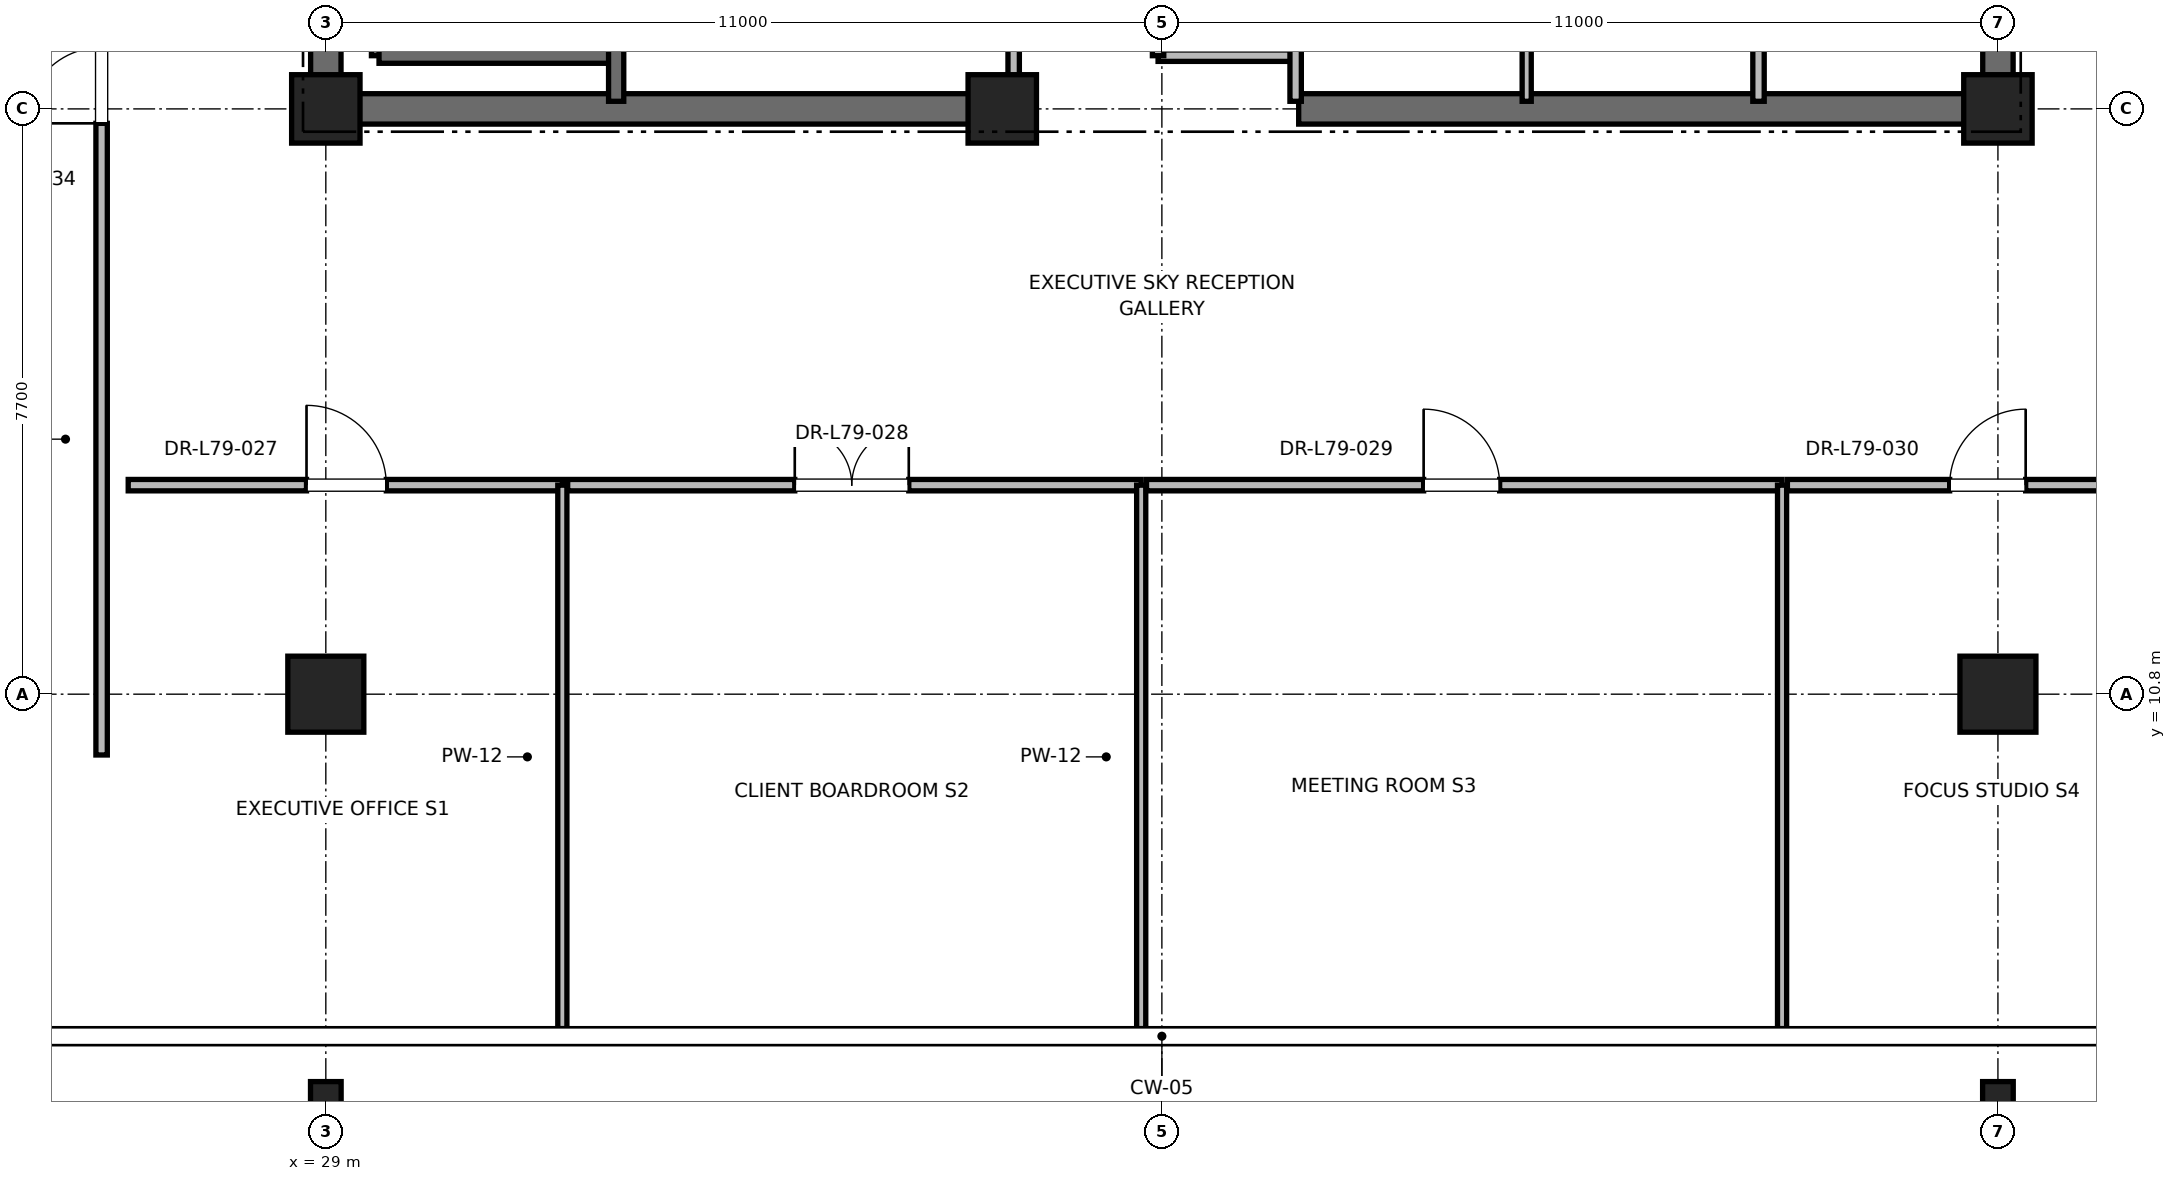
"""IFC4 building model, lengths in metres.
Left out: names, types, materials, properties, quantities, classifications, styles, units other than length and angle.
Written with IfcOpenShell. Run it as: python <this file> out.ifc"""

import sys

from ifc_helpers import new_model, si_unit, direction, frame, frame_2d, origin, origin_2d, place, context, subcontext, project, spatial, rectangle, i_section, extrude, element, fill, save


model = new_model("IFC4")
c1 = context("Model", 3, precision=1e-05, world=origin(), true_north=direction((0.0, 1.0)))
c2 = subcontext(c1, "Body", "Model", "MODEL_VIEW")
j1 = project(units=[si_unit("LENGTHUNIT", "METRE"), si_unit("PLANEANGLEUNIT", "RADIAN")], contexts=[c1])
p1 = place(None, origin())
s1 = spatial("IfcSite", under=j1, at=p1, CompositionType="ELEMENT")
p2 = place(p1, origin())
s2 = spatial("IfcBuilding", under=s1, at=p2, CompositionType="ELEMENT")
p3 = place(p2, frame((0.0, 0.0, 338.8)))
s3 = spatial("IfcBuildingStorey", under=s2, at=p3, CompositionType="ELEMENT", Elevation=338.8)
for number, where, z_axis, x_axis in (
    (1, (29.0, 10.8, 0.0), (0.0, 0.0, 1.0), (1.0, 0.0, 0.0)),
    (2, (51.0, 10.8, 0.0), (0.0, 0.0, 1.0), (1.0, 0.0, 0.0)),
):
    element("IfcColumn", number, at=place(p3, frame(where, z_axis=z_axis, x_axis=x_axis)), inside=s3, PredefinedType="COLUMN", context=c2, shape_type="SweptSolid", body=[
        extrude(rectangle(XDim=1.0, YDim=1.0, at=origin_2d()), origin(), (0.0, 0.0, 1.0), 4.0),
    ])
for number, where, z_axis, x_axis in (
    (3, (29.0, 5.5, 0.0), (0.0, 0.0, 1.0), (1.0, 0.0, 0.0)),
    (4, (51.0, 5.5, 0.0), (0.0, 0.0, 1.0), (1.0, 0.0, 0.0)),
):
    element("IfcColumn", number, at=place(p3, frame(where, z_axis=z_axis, x_axis=x_axis)), inside=s3, PredefinedType="COLUMN", context=c2, shape_type="SweptSolid", body=[
        extrude(i_section(OverallWidth=0.403, OverallDepth=0.406, WebThickness=0.027, FlangeThickness=0.043, FilletRadius=0.015, at=origin_2d()), origin(), (0.0, 0.0, 1.0), 4.0),
    ])
for number, where, z_axis, x_axis in (
    (5, (29.0, 18.5, 0.0), (0.0, 0.0, 1.0), (1.0, 0.0, 0.0)),
    (6, (51.0, 18.5, 0.0), (0.0, 0.0, 1.0), (1.0, 0.0, 0.0)),
    (7, (37.9, 18.5, 0.0), (0.0, 0.0, 1.0), (1.0, 0.0, 0.0)),
):
    element("IfcColumn", number, at=place(p3, frame(where, z_axis=z_axis, x_axis=x_axis)), inside=s3, PredefinedType="PILASTER", context=c2, shape_type="SweptSolid", body=[
        extrude(rectangle(XDim=0.9, YDim=0.9, at=origin_2d()), origin(), (0.0, 0.0, 1.0), 4.0),
    ])
for number, where, z_axis, x_axis in (
    (8, (29.0, 18.5, 0.0), (0.0, 0.0, 1.0), (1.0, 0.0, 0.0)),
    (9, (41.8, 18.5, 0.0), (0.0, 0.0, 1.0), (1.0, 0.0, 0.0)),
):
    element("IfcWall", number, at=place(p3, frame(where, z_axis=z_axis, x_axis=x_axis)), inside=s3, PredefinedType="SHEAR", context=c2, shape_type="SweptSolid", body=[
        extrude(rectangle(XDim=9.2, YDim=0.4, at=frame_2d((4.6, 0.0))), origin(), (0.0, 0.0, 1.0), 3.7),
    ])
p4 = place(p3, frame((29.0, 18.5, 0.0), z_axis=(0.0, 0.0, 1.0), x_axis=(0.0, 1.0, 0.0)))
e10 = element("IfcWall", 10, at=p4, inside=s3, PredefinedType="SHEAR", context=c2, shape_type="SweptSolid", body=[
    extrude(rectangle(XDim=8.8, YDim=0.4, at=frame_2d((4.4, 0.0))), origin(), (0.0, 0.0, 1.0), 3.7),
])
p5 = place(p3, frame((51.0, 18.5, 0.0), z_axis=(0.0, 0.0, 1.0), x_axis=(0.0, 1.0, 0.0)))
e11 = element("IfcWall", 11, at=p5, inside=s3, PredefinedType="SHEAR", context=c2, shape_type="SweptSolid", body=[
    extrude(rectangle(XDim=5.8, YDim=0.4, at=frame_2d((2.9, 0.0))), origin(), (0.0, 0.0, 1.0), 3.7),
])
p6 = place(p3, frame((29.7, 19.2, 0.0), z_axis=(0.0, 0.0, 1.0), x_axis=(0.0, 1.0, 0.0)))
e12 = element("IfcWall", 12, at=p6, inside=s3, PredefinedType="SOLIDWALL", context=c2, shape_type="SweptSolid", body=[
    extrude(rectangle(XDim=8.15, YDim=0.2, at=frame_2d((4.075, 0.0))), origin(), (0.0, 0.0, 1.0), 3.7),
])
p7 = place(p3, frame((29.7, 19.2, 0.0), z_axis=(0.0, 0.0, 1.0), x_axis=(1.0, 0.0, 0.0)))
e13 = element("IfcWall", 13, at=p7, inside=s3, PredefinedType="SOLIDWALL", context=c2, shape_type="SweptSolid", body=[
    extrude(rectangle(XDim=3.12, YDim=0.2, at=frame_2d((1.56, 0.0))), origin(), (0.0, 0.0, 1.0), 3.7),
])
p8 = place(p3, frame((32.82, 18.6, 0.0), z_axis=(0.0, 0.0, 1.0), x_axis=(0.0, 1.0, 0.0)))
e14 = element("IfcWall", 14, at=p8, inside=s3, PredefinedType="SOLIDWALL", context=c2, shape_type="SweptSolid", body=[
    extrude(rectangle(XDim=8.78, YDim=0.2, at=frame_2d((4.39, 0.0))), origin(), (0.0, 0.0, 1.0), 3.7),
])
p9 = place(p3, frame((39.95, 19.2, 0.0), z_axis=(0.0, 0.0, 1.0), x_axis=(1.0, 0.0, 0.0)))
e15 = element("IfcWall", 15, at=p9, inside=s3, PredefinedType="PARTITIONING", context=c2, shape_type="SweptSolid", body=[
    extrude(rectangle(XDim=1.81, YDim=0.15, at=frame_2d((0.905, 0.0))), origin(), (0.0, 0.0, 1.0), 2.85),
])
p10 = place(p3, frame((41.76, 18.6, 0.0), z_axis=(0.0, 0.0, 1.0), x_axis=(0.0, 1.0, 0.0)))
e16 = element("IfcWall", 16, at=p10, inside=s3, PredefinedType="PARTITIONING", context=c2, shape_type="SweptSolid", body=[
    extrude(rectangle(XDim=3.6, YDim=0.15, at=frame_2d((1.8, 0.0))), origin(), (0.0, 0.0, 1.0), 2.78),
])
p11 = place(p3, frame((39.95, 19.2, 0.0), z_axis=(0.0, 0.0, 1.0), x_axis=(0.0, 1.0, 0.0)))
e17 = element("IfcWall", 17, at=p11, inside=s3, PredefinedType="PARTITIONING", context=c2, shape_type="SweptSolid", body=[
    extrude(rectangle(XDim=3.0, YDim=0.15, at=frame_2d((1.5, 0.0))), origin(), (0.0, 0.0, 1.0), 2.85),
])
p12 = place(p11, frame((1.05, 0.0, 0.0)))
e18 = element("IfcOpeningElement", 18, at=p12, cuts=e17, PredefinedType="OPENING", context=c2, shape_type="SweptSolid", body=[
    extrude(rectangle(XDim=0.9, YDim=2.1, at=frame_2d((0.45, 1.05))), frame((0.0, 0.075, 0.0), z_axis=(0.0, -1.0, 0.0), x_axis=(1.0, 0.0, 0.0)), (0.0, 0.0, 1.0), 0.15),
])
p13 = place(p3, frame((38.05, 18.6, 0.0), z_axis=(0.0, 0.0, 1.0), x_axis=(0.0, 1.0, 0.0)))
e19 = element("IfcWall", 19, at=p13, inside=s3, PredefinedType="PARTITIONING", context=c2, shape_type="SweptSolid", body=[
    extrude(rectangle(XDim=4.46, YDim=0.15, at=frame_2d((2.23, 0.0))), origin(), (0.0, 0.0, 1.0), 2.78),
])
p14 = place(p13, frame((1.73, 0.0, 0.0)))
e20 = element("IfcOpeningElement", 20, at=p14, cuts=e19, PredefinedType="OPENING", context=c2, shape_type="SweptSolid", body=[
    extrude(rectangle(XDim=1.0, YDim=2.15, at=frame_2d((0.5, 1.075))), frame((0.0, 0.075, 0.0), z_axis=(0.0, -1.0, 0.0), x_axis=(1.0, 0.0, 0.0)), (0.0, 0.0, 1.0), 0.15),
])
p15 = place(p3, frame((47.85, 18.6, 0.0), z_axis=(0.0, 0.0, 1.0), x_axis=(0.0, 1.0, 0.0)))
e21 = element("IfcWall", 21, at=p15, inside=s3, PredefinedType="PARTITIONING", context=c2, shape_type="SweptSolid", body=[
    extrude(rectangle(XDim=2.54, YDim=0.15, at=frame_2d((1.27, 0.0))), origin(), (0.0, 0.0, 1.0), 2.85),
])
p16 = place(p3, frame((44.8, 18.6, 0.0), z_axis=(0.0, 0.0, 1.0), x_axis=(0.0, 1.0, 0.0)))
e22 = element("IfcWall", 22, at=p16, inside=s3, PredefinedType="PARTITIONING", context=c2, shape_type="SweptSolid", body=[
    extrude(rectangle(XDim=3.02, YDim=0.12, at=frame_2d((1.51, 0.0))), origin(), (0.0, 0.0, 1.0), 2.85),
])
p17 = place(p3, frame((26.4, 13.55, 0.0), z_axis=(0.0, 0.0, 1.0), x_axis=(1.0, 0.0, 0.0)))
e23 = element("IfcWall", 23, at=p17, inside=s3, PredefinedType="PARTITIONING", context=c2, shape_type="SweptSolid", body=[
    extrude(rectangle(XDim=5.712, YDim=0.15, at=frame_2d((2.856, 0.0))), origin(), (0.0, 0.0, 1.0), 2.753),
])
p18 = place(p17, frame((2.346, 0.0, 0.0)))
e24 = element("IfcOpeningElement", 24, at=p18, cuts=e23, PredefinedType="OPENING", context=c2, shape_type="SweptSolid", body=[
    extrude(rectangle(XDim=1.05, YDim=2.2, at=frame_2d((0.525, 1.1))), frame((0.0, 0.075, 0.0), z_axis=(0.0, -1.0, 0.0), x_axis=(1.0, 0.0, 0.0)), (0.0, 0.0, 1.0), 0.15),
])
p19 = place(p3, frame((32.112, 6.4, 0.0), z_axis=(0.0, 0.0, 1.0), x_axis=(0.0, 1.0, 0.0)))
e25 = element("IfcWall", 25, at=p19, inside=s3, PredefinedType="PARTITIONING", context=c2, shape_type="SweptSolid", body=[
    extrude(rectangle(XDim=7.15, YDim=0.12, at=frame_2d((3.575, 0.0))), origin(), (0.0, 0.0, 1.0), 2.33),
])
p20 = place(p3, frame((32.182, 13.55, 0.0), z_axis=(0.0, 0.0, 1.0), x_axis=(1.0, 0.0, 0.0)))
e26 = element("IfcWall", 26, at=p20, inside=s3, PredefinedType="PARTITIONING", context=c2, shape_type="SweptSolid", body=[
    extrude(rectangle(XDim=7.546, YDim=0.15, at=frame_2d((3.773, 0.0))), origin(), (0.0, 0.0, 1.0), 2.85),
])
p21 = place(p20, frame((2.988, 0.0, 0.0)))
e27 = element("IfcOpeningElement", 27, at=p21, cuts=e26, PredefinedType="OPENING", context=c2, shape_type="SweptSolid", body=[
    extrude(rectangle(XDim=1.5, YDim=2.25, at=frame_2d((0.75, 1.125))), frame((0.0, 0.075, 0.0), z_axis=(0.0, -1.0, 0.0), x_axis=(1.0, 0.0, 0.0)), (0.0, 0.0, 1.0), 0.15),
])
p22 = place(p3, frame((39.728, 6.4, 0.0), z_axis=(0.0, 0.0, 1.0), x_axis=(0.0, 1.0, 0.0)))
e28 = element("IfcWall", 28, at=p22, inside=s3, PredefinedType="PARTITIONING", context=c2, shape_type="SweptSolid", body=[
    extrude(rectangle(XDim=7.15, YDim=0.12, at=frame_2d((3.575, 0.0))), origin(), (0.0, 0.0, 1.0), 2.33),
])
p23 = place(p3, frame((39.798, 13.55, 0.0), z_axis=(0.0, 0.0, 1.0), x_axis=(1.0, 0.0, 0.0)))
e29 = element("IfcWall", 29, at=p23, inside=s3, PredefinedType="PARTITIONING", context=c2, shape_type="SweptSolid", body=[
    extrude(rectangle(XDim=8.362, YDim=0.15, at=frame_2d((4.181, 0.0))), origin(), (0.0, 0.0, 1.0), 2.85),
])
p24 = place(p23, frame((3.646, 0.0, 0.0)))
e30 = element("IfcOpeningElement", 30, at=p24, cuts=e29, PredefinedType="OPENING", context=c2, shape_type="SweptSolid", body=[
    extrude(rectangle(XDim=1.0, YDim=2.15, at=frame_2d((0.5, 1.075))), frame((0.0, 0.075, 0.0), z_axis=(0.0, -1.0, 0.0), x_axis=(1.0, 0.0, 0.0)), (0.0, 0.0, 1.0), 0.15),
])
p25 = place(p3, frame((48.16, 6.4, 0.0), z_axis=(0.0, 0.0, 1.0), x_axis=(0.0, 1.0, 0.0)))
e31 = element("IfcWall", 31, at=p25, inside=s3, PredefinedType="PARTITIONING", context=c2, shape_type="SweptSolid", body=[
    extrude(rectangle(XDim=7.15, YDim=0.12, at=frame_2d((3.575, 0.0))), origin(), (0.0, 0.0, 1.0), 2.33),
])
p26 = place(p3, frame((48.23, 13.55, 0.0), z_axis=(0.0, 0.0, 1.0), x_axis=(1.0, 0.0, 0.0)))
e32 = element("IfcWall", 32, at=p26, inside=s3, PredefinedType="PARTITIONING", context=c2, shape_type="SweptSolid", body=[
    extrude(rectangle(XDim=5.37, YDim=0.15, at=frame_2d((2.685, 0.0))), origin(), (0.0, 0.0, 1.0), 2.753),
])
p27 = place(p26, frame((2.135, 0.0, 0.0)))
e33 = element("IfcOpeningElement", 33, at=p27, cuts=e32, PredefinedType="OPENING", context=c2, shape_type="SweptSolid", body=[
    extrude(rectangle(XDim=1.0, YDim=2.15, at=frame_2d((0.5, 1.075))), frame((0.0, 0.075, 0.0), z_axis=(0.0, -1.0, 0.0), x_axis=(1.0, 0.0, 0.0)), (0.0, 0.0, 1.0), 0.15),
])
p28 = place(p3, frame((26.05, 10.0, 0.0), z_axis=(0.0, 0.0, 1.0), x_axis=(0.0, 1.0, 0.0)))
e34 = element("IfcWall", 34, at=p28, inside=s3, PredefinedType="PARTITIONING", context=c2, shape_type="SweptSolid", body=[
    extrude(rectangle(XDim=9.45, YDim=0.15, at=frame_2d((4.725, 0.0))), origin(), (0.0, 0.0, 1.0), 2.753),
])
p29 = place(p28, frame((8.31, 0.0, 0.0)))
e35 = element("IfcOpeningElement", 35, at=p29, cuts=e34, PredefinedType="OPENING", context=c2, shape_type="SweptSolid", body=[
    extrude(rectangle(XDim=1.0, YDim=2.15, at=frame_2d((0.5, 1.075))), frame((0.0, 0.075, 0.0), z_axis=(0.0, -1.0, 0.0), x_axis=(1.0, 0.0, 0.0)), (0.0, 0.0, 1.0), 0.15),
])
p30 = place(p18, origin())
e36 = element("IfcDoor", 36, at=p30, inside=s3, OperationType="SINGLE_SWING_LEFT", PredefinedType="DOOR", context=c2, shape_type="SweptSolid", body=[
    extrude(rectangle(XDim=1.05, YDim=2.2, at=frame_2d((0.525, 1.1))), frame((0.0, 0.025, 0.0), z_axis=(0.0, -1.0, 0.0), x_axis=(1.0, 0.0, 0.0)), (0.0, 0.0, 1.0), 0.05),
])
fill(e24, e36)
p31 = place(p21, origin())
e37 = element("IfcDoor", 37, at=p31, inside=s3, OperationType="DOUBLE_DOOR_SINGLE_SWING", PredefinedType="DOOR", context=c2, shape_type="SweptSolid", body=[
    extrude(rectangle(XDim=1.5, YDim=2.25, at=frame_2d((0.75, 1.125))), frame((0.0, 0.025, 0.0), z_axis=(0.0, -1.0, 0.0), x_axis=(1.0, 0.0, 0.0)), (0.0, 0.0, 1.0), 0.05),
])
fill(e27, e37)
p32 = place(p24, origin())
e38 = element("IfcDoor", 38, at=p32, inside=s3, OperationType="SINGLE_SWING_LEFT", PredefinedType="DOOR", context=c2, shape_type="SweptSolid", body=[
    extrude(rectangle(XDim=1.0, YDim=2.15, at=frame_2d((0.5, 1.075))), frame((0.0, 0.025, 0.0), z_axis=(0.0, -1.0, 0.0), x_axis=(1.0, 0.0, 0.0)), (0.0, 0.0, 1.0), 0.05),
])
fill(e30, e38)
p33 = place(p27, origin())
e39 = element("IfcDoor", 39, at=p33, inside=s3, OperationType="SINGLE_SWING_RIGHT", PredefinedType="DOOR", context=c2, shape_type="SweptSolid", body=[
    extrude(rectangle(XDim=1.0, YDim=2.15, at=frame_2d((0.5, 1.075))), frame((0.0, 0.025, 0.0), z_axis=(0.0, -1.0, 0.0), x_axis=(1.0, 0.0, 0.0)), (0.0, 0.0, 1.0), 0.05),
])
fill(e33, e39)
p34 = place(p29, origin())
e40 = element("IfcDoor", 40, at=p34, inside=s3, OperationType="SINGLE_SWING_LEFT", PredefinedType="DOOR", context=c2, shape_type="SweptSolid", body=[
    extrude(rectangle(XDim=1.0, YDim=2.15, at=frame_2d((0.5, 1.075))), frame((0.0, 0.025, 0.0), z_axis=(0.0, -1.0, 0.0), x_axis=(1.0, 0.0, 0.0)), (0.0, 0.0, 1.0), 0.05),
])
fill(e35, e40)
save(model, sys.argv[1])
